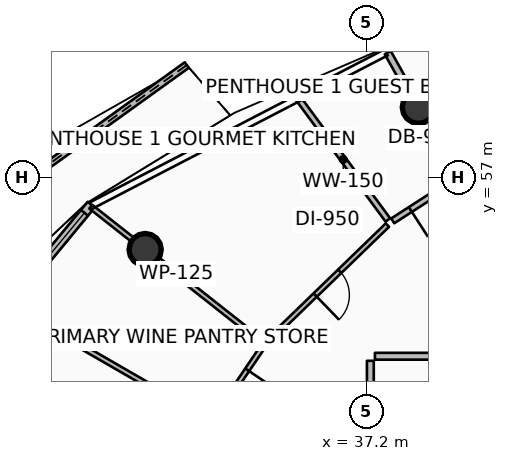
"""IFC4 building model, lengths in metres.
Left out: names, types, materials, properties, quantities, classifications, styles, units other than length and angle.
Written with IfcOpenShell. Run it as: python <this file> out.ifc"""

import sys

from ifc_helpers import new_model, si_unit, direction, frame, frame_2d, origin, origin_2d, place, context, subcontext, project, spatial, polyline, rectangle, circle, outline, extrude, element, fill, save


model = new_model("IFC4")
c1 = context("Model", 3, precision=1e-05, world=origin(), true_north=direction((0.0, 1.0)))
c2 = subcontext(c1, "Body", "Model", "MODEL_VIEW")
j1 = project(units=[si_unit("LENGTHUNIT", "METRE"), si_unit("PLANEANGLEUNIT", "RADIAN")], contexts=[c1])
p1 = place(None, origin())
s1 = spatial("IfcSite", under=j1, at=p1, CompositionType="ELEMENT")
p2 = place(p1, origin())
s2 = spatial("IfcBuilding", under=s1, at=p2, CompositionType="ELEMENT")
p3 = place(p2, frame((0.0, 0.0, 322.1)))
s3 = spatial("IfcBuildingStorey", under=s2, at=p3, CompositionType="ELEMENT", Elevation=322.1)
for number, where, z_axis, x_axis in (
    (1, (38.563, 58.851, 0.0), (0.0, 0.0, 1.0), (1.0, 0.0, 0.0)),
    (2, (31.374, 55.107, 0.0), (0.0, 0.0, 1.0), (1.0, 0.0, 0.0)),
):
    element("IfcColumn", number, at=place(p3, frame(where, z_axis=z_axis, x_axis=x_axis)), inside=s3, PredefinedType="COLUMN", context=c2, shape_type="SweptSolid", body=[
        extrude(circle(Radius=0.425, at=origin_2d()), origin(), (0.0, 0.0, 1.0), 3.94),
    ])
p4 = place(p3, frame((32.469, 59.961, 0.0), z_axis=(0.0, 0.0, 1.0), x_axis=(-0.812019730163, -0.583629983659, 0.0)))
e3 = element("IfcWall", 3, at=p4, inside=s3, PredefinedType="PARAPET", context=c2, shape_type="SweptSolid", body=[
    extrude(outline(polyline([(0.0, 0.0), (9.954, 0.0), (9.954, 1.632), (4.977, 1.418), (0.0, 1.233), (0.0, 0.0)])), frame((0.0, 0.09, 0.0), z_axis=(0.0, -1.0, 0.0), x_axis=(1.0, 0.0, 0.0)), (0.0, 0.0, 1.0), 0.18),
])
p5 = place(p3, frame((29.955, 56.289, 0.0), z_axis=(0.0, 0.0, 1.0), x_axis=(-0.636803612721, -0.771026042897, 0.0)))
e4 = element("IfcWall", 4, at=p5, inside=s3, PredefinedType="SOLIDWALL", context=c2, shape_type="SweptSolid", body=[
    extrude(rectangle(XDim=9.728, YDim=0.24, at=frame_2d((4.864, 0.0))), origin(), (0.0, 0.0, 1.0), 2.89),
])
p6 = place(p5, frame((7.508, 0.0, 0.0)))
e5 = element("IfcOpeningElement", 5, at=p6, cuts=e4, PredefinedType="OPENING", context=c2, shape_type="SweptSolid", body=[
    extrude(rectangle(XDim=1.45, YDim=2.15, at=frame_2d((0.725, 1.075))), frame((0.0, 0.13, 0.0), z_axis=(0.0, -1.0, 0.0), x_axis=(1.0, 0.0, 0.0)), (0.0, 0.0, 1.0), 0.26),
])
p7 = place(p5, frame((0.28, 0.0, 0.65)))
e6 = element("IfcOpeningElement", 6, at=p7, cuts=e4, PredefinedType="OPENING", context=c2, shape_type="SweptSolid", body=[
    extrude(rectangle(XDim=1.6, YDim=1.5, at=frame_2d((0.8, 0.75))), frame((0.0, 0.13, 0.0), z_axis=(0.0, -1.0, 0.0), x_axis=(1.0, 0.0, 0.0)), (0.0, 0.0, 1.0), 0.26),
])
p8 = place(p3, frame((42.232, 52.3, 0.0), z_axis=(0.0, 0.0, 1.0), x_axis=(-0.488623665245, 0.872494649704, 0.0)))
e7 = element("IfcWall", 7, at=p8, inside=s3, PredefinedType="PARTITIONING", context=c2, shape_type="SweptSolid", body=[
    extrude(rectangle(XDim=9.157, YDim=0.18, at=frame_2d((4.579, 0.0))), origin(), (0.0, 0.0, 1.0), 3.38),
])
p9 = place(p3, frame((42.112, 52.3, 0.0), z_axis=(0.0, 0.0, 1.0), x_axis=(-1.0, 0.0, 0.0)))
e8 = element("IfcWall", 8, at=p9, inside=s3, PredefinedType="PARTITIONING", context=c2, shape_type="SweptSolid", body=[
    extrude(rectangle(XDim=4.692, YDim=0.18, at=frame_2d((2.346, 0.0))), origin(), (0.0, 0.0, 1.0), 3.38),
])
p10 = place(p3, frame((37.3, 52.18, 0.0), z_axis=(0.0, 0.0, 1.0), x_axis=(0.0, -1.0, 0.0)))
e9 = element("IfcWall", 9, at=p10, inside=s3, PredefinedType="PARTITIONING", context=c2, shape_type="SweptSolid", body=[
    extrude(rectangle(XDim=1.625, YDim=0.18, at=frame_2d((0.812, 0.0))), origin(), (0.0, 0.0, 1.0), 3.38),
])
p11 = place(p3, frame((39.53, 56.92, 0.0), z_axis=(0.0, 0.0, 1.0), x_axis=(-0.840344430655, -0.542052799889, 0.0)))
e10 = element("IfcWall", 10, at=p11, inside=s3, PredefinedType="PARTITIONING", context=c2, shape_type="SweptSolid", body=[
    extrude(rectangle(XDim=1.952, YDim=0.15, at=frame_2d((0.976, 0.0))), origin(), (0.0, 0.0, 1.0), 3.38),
])
p12 = place(p11, frame((0.551, 0.0, 0.0)))
e11 = element("IfcOpeningElement", 11, at=p12, cuts=e10, PredefinedType="OPENING", context=c2, shape_type="SweptSolid", body=[
    extrude(rectangle(XDim=0.85, YDim=2.06, at=frame_2d((0.425, 1.03))), frame((0.0, 0.085, 0.0), z_axis=(0.0, -1.0, 0.0), x_axis=(1.0, 0.0, 0.0)), (0.0, 0.0, 1.0), 0.17),
])
p13 = place(p3, frame((37.76, 55.886, 0.0), z_axis=(0.0, 0.0, 1.0), x_axis=(-0.593476725003, 0.804851152002, 0.0)))
e12 = element("IfcWall", 12, at=p13, inside=s3, PredefinedType="PARTITIONING", context=c2, shape_type="SweptSolid", body=[
    extrude(rectangle(XDim=3.958, YDim=0.15, at=frame_2d((1.979, 0.0))), origin(), (0.0, 0.0, 1.0), 3.38),
])
p14 = place(p3, frame((37.749, 55.751, 0.0), z_axis=(0.0, 0.0, 1.0), x_axis=(-0.718380815069, -0.695650058967, 0.0)))
e13 = element("IfcWall", 13, at=p14, inside=s3, PredefinedType="PARTITIONING", context=c2, shape_type="SweptSolid", body=[
    extrude(rectangle(XDim=4.393, YDim=0.125, at=frame_2d((2.196, 0.0))), origin(), (0.0, 0.0, 1.0), 3.38),
])
p15 = place(p14, frame((1.746, 0.0, 0.0)))
e14 = element("IfcOpeningElement", 14, at=p15, cuts=e13, PredefinedType="OPENING", context=c2, shape_type="SweptSolid", body=[
    extrude(rectangle(XDim=0.9, YDim=2.08, at=frame_2d((0.45, 1.04))), frame((0.0, 0.073, 0.0), z_axis=(0.0, -1.0, 0.0), x_axis=(1.0, 0.0, 0.0)), (0.0, 0.0, 1.0), 0.145),
])
p16 = place(p3, frame((34.443, 52.688, 0.0), z_axis=(0.0, 0.0, 1.0), x_axis=(-0.785329715116, 0.61907773224, 0.0)))
e15 = element("IfcWall", 15, at=p16, inside=s3, PredefinedType="PARTITIONING", context=c2, shape_type="SweptSolid", body=[
    extrude(rectangle(XDim=5.73, YDim=0.125, at=frame_2d((2.865, 0.0))), origin(), (0.0, 0.0, 1.0), 3.38),
])
p17 = place(p3, frame((33.054, 50.619, 0.0), z_axis=(0.0, 0.0, 1.0), x_axis=(-0.86627763932, 0.499562860524, 0.0)))
e16 = element("IfcWall", 16, at=p17, inside=s3, PredefinedType="PARTITIONING", context=c2, shape_type="SweptSolid", body=[
    extrude(rectangle(XDim=5.96, YDim=0.125, at=frame_2d((2.98, 0.0))), origin(), (0.0, 0.0, 1.0), 3.38),
])
p18 = place(p3, frame((34.466, 52.543, 0.0), z_axis=(0.0, 0.0, 1.0), x_axis=(-0.560789421623, -0.827958467917, 0.0)))
e17 = element("IfcWall", 17, at=p18, inside=s3, PredefinedType="PARTITIONING", context=c2, shape_type="SweptSolid", body=[
    extrude(rectangle(XDim=2.298, YDim=0.125, at=frame_2d((1.149, 0.0))), origin(), (0.0, 0.0, 1.0), 3.38),
])
p19 = place(p18, frame((0.724, 0.0, 0.0)))
e18 = element("IfcOpeningElement", 18, at=p19, cuts=e17, PredefinedType="OPENING", context=c2, shape_type="SweptSolid", body=[
    extrude(rectangle(XDim=0.85, YDim=2.06, at=frame_2d((0.425, 1.03))), frame((0.0, 0.073, 0.0), z_axis=(0.0, -1.0, 0.0), x_axis=(1.0, 0.0, 0.0)), (0.0, 0.0, 1.0), 0.145),
])
p20 = place(p7, origin())
e19 = element("IfcWindow", 19, at=p20, inside=s3, PartitioningType="SINGLE_PANEL", PredefinedType="WINDOW", context=c2, shape_type="SweptSolid", body=[
    extrude(rectangle(XDim=1.6, YDim=1.5, at=frame_2d((0.8, 0.75))), frame((0.0, 0.03, 0.0), z_axis=(0.0, -1.0, 0.0), x_axis=(1.0, 0.0, 0.0)), (0.0, 0.0, 1.0), 0.06),
])
fill(e6, e19)
p21 = place(p12, origin())
e20 = element("IfcDoor", 20, at=p21, inside=s3, OperationType="SINGLE_SWING_RIGHT", PredefinedType="DOOR", context=c2, shape_type="SweptSolid", body=[
    extrude(rectangle(XDim=0.85, YDim=2.06, at=frame_2d((0.425, 1.03))), frame((0.0, 0.025, 0.0), z_axis=(0.0, -1.0, 0.0), x_axis=(1.0, 0.0, 0.0)), (0.0, 0.0, 1.0), 0.05),
])
fill(e11, e20)
p22 = place(p15, origin())
e21 = element("IfcDoor", 21, at=p22, inside=s3, OperationType="SINGLE_SWING_RIGHT", PredefinedType="DOOR", context=c2, shape_type="SweptSolid", body=[
    extrude(rectangle(XDim=0.9, YDim=2.08, at=frame_2d((0.45, 1.04))), frame((0.0, 0.025, 0.0), z_axis=(0.0, -1.0, 0.0), x_axis=(1.0, 0.0, 0.0)), (0.0, 0.0, 1.0), 0.05),
])
fill(e14, e21)
p23 = place(p19, origin())
e22 = element("IfcDoor", 22, at=p23, inside=s3, OperationType="SINGLE_SWING_LEFT", PredefinedType="DOOR", context=c2, shape_type="SweptSolid", body=[
    extrude(rectangle(XDim=0.85, YDim=2.06, at=frame_2d((0.425, 1.03))), frame((0.0, 0.025, 0.0), z_axis=(0.0, -1.0, 0.0), x_axis=(1.0, 0.0, 0.0)), (0.0, 0.0, 1.0), 0.05),
])
fill(e18, e22)
save(model, sys.argv[1])
